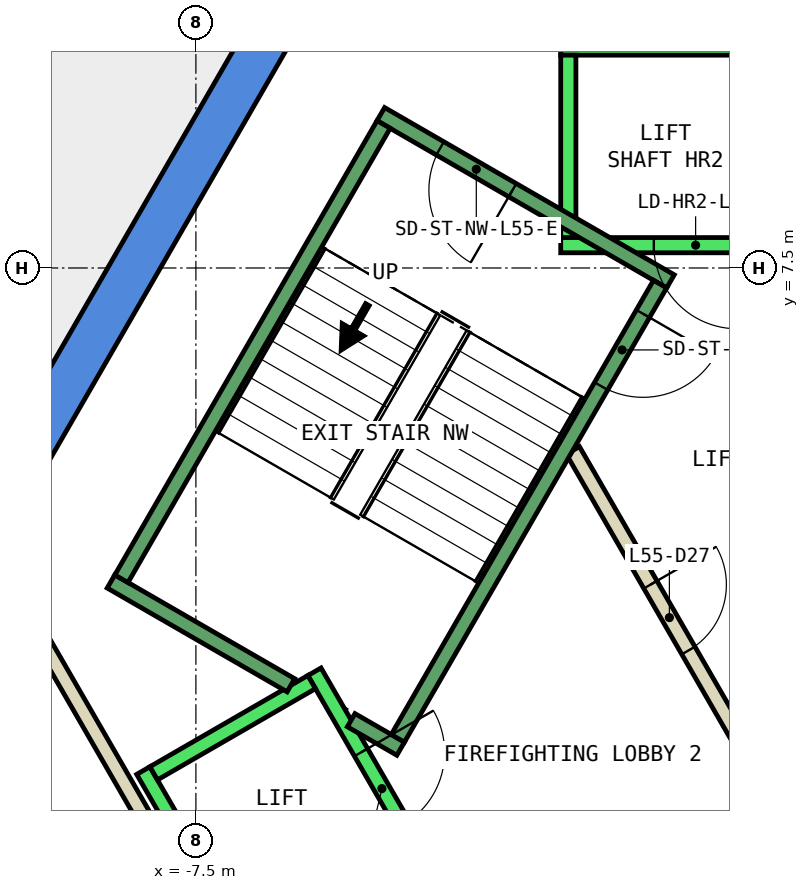
"""IFC4 building model, lengths in metres.
Left out: names, types, materials, properties, quantities, classifications, styles, units other than length and angle.
Written with IfcOpenShell. Run it as: python <this file> out.ifc"""

import sys

from ifc_helpers import new_model, si_unit, direction, frame, frame_2d, origin, place, context, subcontext, project, spatial, polyline, rectangle, outline, extrude, element, fill, save


model = new_model("IFC4")
c1 = context("Model", 3, precision=1e-05, world=origin(), true_north=direction((0.0, 1.0)))
c2 = subcontext(c1, "Body", "Model", "MODEL_VIEW")
j1 = project(units=[si_unit("LENGTHUNIT", "METRE"), si_unit("PLANEANGLEUNIT", "RADIAN")], contexts=[c1])
p1 = place(None, origin())
s1 = spatial("IfcSite", under=j1, at=p1, CompositionType="ELEMENT")
p2 = place(p1, origin())
s2 = spatial("IfcBuilding", under=s1, at=p2, CompositionType="ELEMENT")
p3 = place(p2, frame((0.0, 0.0, 245.0)))
s3 = spatial("IfcBuildingStorey", under=s2, at=p3, CompositionType="ELEMENT", Elevation=245.0)
p4 = place(p3, frame((0.0, 0.0, -0.34)))
e1 = element("IfcWall", 1, at=p4, inside=s3, PredefinedType="SHEAR", context=c2, shape_type="SweptSolid", body=[
    extrude(outline(polyline([(-10.535, 4.253), (-10.015, 3.953), (-5.427, 11.9), (-5.774, 12.5), (-10.535, 4.253)])), origin(), (0.0, 0.0, 1.0), 3.6),
])
p5 = place(p3, frame((0.0, 0.0, -0.34)))
e2 = element("IfcWall", 2, at=p5, inside=s3, PredefinedType="SHEAR", context=c2, shape_type="SweptSolid", body=[
    extrude(outline(polyline([(-11.547, 2.5), (-5.774, -7.5), (-5.427, -6.9), (-10.854, 2.5), (-11.547, 2.5)])), origin(), (0.0, 0.0, 1.0), 3.6),
])
p6 = place(p3, frame((-10.576, 9.849, 0.0), z_axis=(0.0, 0.0, 1.0), x_axis=(0.517026085378, 0.855969641423, 0.0)))
e3 = element("IfcWall", 3, at=p6, inside=s3, PredefinedType="PARTITIONING", context=c2, shape_type="SweptSolid", body=[
    extrude(rectangle(XDim=6.408, YDim=0.2, at=frame_2d((3.204, 0.0))), origin(), (0.0, 0.0, 1.0), 3.26),
])
p7 = place(p6, frame((2.779, 0.0, 0.0)))
e4 = element("IfcOpeningElement", 4, at=p7, cuts=e3, PredefinedType="OPENING", context=c2, shape_type="SweptSolid", body=[
    extrude(rectangle(XDim=1.0, YDim=2.1, at=frame_2d((0.5, 1.05))), frame((0.0, 0.11, 0.0), z_axis=(0.0, -1.0, 0.0), x_axis=(1.0, 0.0, 0.0)), (0.0, 0.0, 1.0), 0.22),
])
p8 = place(p3, frame((-9.751, 2.99, 0.0), z_axis=(0.0, 0.0, 1.0), x_axis=(0.500012163284, -0.866018381195, 0.0)))
e5 = element("IfcWall", 5, at=p8, inside=s3, PredefinedType="PARTITIONING", context=c2, shape_type="SweptSolid", body=[
    extrude(rectangle(XDim=8.0, YDim=0.2, at=frame_2d((4.0, 0.0))), origin(), (0.0, 0.0, 1.0), 3.26),
])
p9 = place(p3, frame((-0.982, -1.0, 0.0), z_axis=(0.0, 0.0, 1.0), x_axis=(0.50024047865, 0.865886518847, 0.0)))
e6 = element("IfcWall", 6, at=p9, inside=s3, PredefinedType="PARTITIONING", context=c2, shape_type="SweptSolid", body=[
    extrude(rectangle(XDim=1.863, YDim=0.2, at=frame_2d((0.931, 0.0))), origin(), (0.0, 0.0, 1.0), 3.26),
])
p10 = place(p3, frame((-2.54, 5.1, 0.0), z_axis=(0.0, 0.0, 1.0), x_axis=(0.499925051871, -0.866068670783, 0.0)))
e7 = element("IfcWall", 7, at=p10, inside=s3, PredefinedType="PARTITIONING", context=c2, shape_type="SweptSolid", body=[
    extrude(rectangle(XDim=5.181, YDim=0.2, at=frame_2d((2.59, 0.0))), origin(), (0.0, 0.0, 1.0), 3.26),
])
p11 = place(p10, frame((2.04, 0.0, 0.0)))
e8 = element("IfcOpeningElement", 8, at=p11, cuts=e7, PredefinedType="OPENING", context=c2, shape_type="SweptSolid", body=[
    extrude(rectangle(XDim=1.0, YDim=2.1, at=frame_2d((0.5, 1.05))), frame((0.0, 0.11, 0.0), z_axis=(0.0, -1.0, 0.0), x_axis=(1.0, 0.0, 0.0)), (0.0, 0.0, 1.0), 0.22),
])
p12 = place(p3, frame((2.7, 7.8, 0.0), z_axis=(0.0, 0.0, 1.0), x_axis=(-1.0, 0.0, 0.0)))
e9 = element("IfcWall", 9, at=p12, inside=s3, PredefinedType="STANDARD", context=c2, shape_type="SweptSolid", body=[
    extrude(rectangle(XDim=5.4, YDim=0.2, at=frame_2d((2.7, 0.0))), origin(), (0.0, 0.0, 1.0), 3.26),
])
p13 = place(p12, frame((1.225, 0.0, 0.0)))
e10 = element("IfcOpeningElement", 10, at=p13, cuts=e9, PredefinedType="OPENING", context=c2, shape_type="SweptSolid", body=[
    extrude(rectangle(XDim=1.1, YDim=2.1, at=frame_2d((0.55, 1.05))), frame((0.0, 0.11, 0.0), z_axis=(0.0, -1.0, 0.0), x_axis=(1.0, 0.0, 0.0)), (0.0, 0.0, 1.0), 0.22),
])
p14 = place(p12, frame((3.075, 0.0, 0.0)))
e11 = element("IfcOpeningElement", 11, at=p14, cuts=e9, PredefinedType="OPENING", context=c2, shape_type="SweptSolid", body=[
    extrude(rectangle(XDim=1.1, YDim=2.1, at=frame_2d((0.55, 1.05))), frame((0.0, 0.11, 0.0), z_axis=(0.0, -1.0, 0.0), x_axis=(1.0, 0.0, 0.0)), (0.0, 0.0, 1.0), 0.22),
])
p15 = place(p3, frame((2.7, 10.4, 0.0), z_axis=(0.0, 0.0, 1.0), x_axis=(-1.0, 0.0, 0.0)))
e12 = element("IfcWall", 12, at=p15, inside=s3, PredefinedType="STANDARD", context=c2, shape_type="SweptSolid", body=[
    extrude(rectangle(XDim=5.4, YDim=0.2, at=frame_2d((2.7, 0.0))), origin(), (0.0, 0.0, 1.0), 3.26),
])
p16 = place(p3, frame((-2.6, 7.9, 0.0), z_axis=(0.0, 0.0, 1.0), x_axis=(0.0, 1.0, 0.0)))
e13 = element("IfcWall", 13, at=p16, inside=s3, PredefinedType="STANDARD", context=c2, shape_type="SweptSolid", body=[
    extrude(rectangle(XDim=2.4, YDim=0.2, at=frame_2d((1.2, 0.0))), origin(), (0.0, 0.0, 1.0), 3.26),
])
p17 = place(p3, frame((-5.94, 2.188, 0.0), z_axis=(0.0, 0.0, 1.0), x_axis=(0.500034260056, -0.866005622828, 0.0)))
e14 = element("IfcWall", 14, at=p17, inside=s3, PredefinedType="STANDARD", context=c2, shape_type="SweptSolid", body=[
    extrude(rectangle(XDim=5.399, YDim=0.2, at=frame_2d((2.7, 0.0))), origin(), (0.0, 0.0, 1.0), 3.26),
])
p18 = place(p17, frame((3.075, 0.0, 0.0)))
e15 = element("IfcOpeningElement", 15, at=p18, cuts=e14, PredefinedType="OPENING", context=c2, shape_type="SweptSolid", body=[
    extrude(rectangle(XDim=1.1, YDim=2.1, at=frame_2d((0.55, 1.05))), frame((0.0, 0.11, 0.0), z_axis=(0.0, -1.0, 0.0), x_axis=(1.0, 0.0, 0.0)), (0.0, 0.0, 1.0), 0.22),
])
p19 = place(p17, frame((1.225, 0.0, 0.0)))
e16 = element("IfcOpeningElement", 16, at=p19, cuts=e14, PredefinedType="OPENING", context=c2, shape_type="SweptSolid", body=[
    extrude(rectangle(XDim=1.1, YDim=2.1, at=frame_2d((0.55, 1.05))), frame((0.0, 0.11, 0.0), z_axis=(0.0, -1.0, 0.0), x_axis=(1.0, 0.0, 0.0)), (0.0, 0.0, 1.0), 0.22),
])
p20 = place(p3, frame((-8.192, 0.888, 0.0), z_axis=(0.0, 0.0, 1.0), x_axis=(0.500034260056, -0.866005622828, 0.0)))
e17 = element("IfcWall", 17, at=p20, inside=s3, PredefinedType="STANDARD", context=c2, shape_type="SweptSolid", body=[
    extrude(rectangle(XDim=5.399, YDim=0.2, at=frame_2d((2.7, 0.0))), origin(), (0.0, 0.0, 1.0), 3.26),
])
p21 = place(p3, frame((-5.977, 2.052, 0.0), z_axis=(0.0, 0.0, 1.0), x_axis=(-0.865973769406, -0.500089422704, 0.0)))
e18 = element("IfcWall", 18, at=p21, inside=s3, PredefinedType="STANDARD", context=c2, shape_type="SweptSolid", body=[
    extrude(rectangle(XDim=2.399, YDim=0.2, at=frame_2d((1.2, 0.0))), origin(), (0.0, 0.0, 1.0), 3.26),
])
p22 = place(p3, frame((-1.256, 7.324, 0.0), z_axis=(0.0, 0.0, 1.0), x_axis=(-0.866046073146, 0.499964197906, 0.0)))
e19 = element("IfcWall", 19, at=p22, inside=s3, PredefinedType="STANDARD", context=c2, shape_type="SweptSolid", body=[
    extrude(rectangle(XDim=4.4, YDim=0.2, at=frame_2d((2.2, 0.0))), origin(), (0.0, 0.0, 1.0), 3.26),
])
p23 = place(p22, frame((2.4, 0.0, 0.0)))
e20 = element("IfcOpeningElement", 20, at=p23, cuts=e19, PredefinedType="OPENING", context=c2, shape_type="SweptSolid", body=[
    extrude(rectangle(XDim=1.1, YDim=2.2, at=frame_2d((0.55, 1.1))), frame((0.0, 0.11, 0.0), z_axis=(0.0, -1.0, 0.0), x_axis=(1.0, 0.0, 0.0)), (0.0, 0.0, 1.0), 0.22),
])
p24 = place(p3, frame((-6.25, 2.01, 0.0), z_axis=(0.0, 0.0, 1.0), x_axis=(-0.86611865017, 0.499838457731, 0.0)))
e21 = element("IfcWall", 21, at=p24, inside=s3, PredefinedType="STANDARD", context=c2, shape_type="SweptSolid", body=[
    extrude(rectangle(XDim=2.733, YDim=0.2, at=frame_2d((1.366, 0.0))), origin(), (0.0, 0.0, 1.0), 3.26),
])
p25 = place(p3, frame((-4.806, 1.176, 0.0), z_axis=(0.0, 0.0, 1.0), x_axis=(-0.866558586415, 0.499075361355, 0.0)))
e22 = element("IfcWall", 22, at=p25, inside=s3, PredefinedType="STANDARD", context=c2, shape_type="SweptSolid", body=[
    extrude(rectangle(XDim=0.751, YDim=0.2, at=frame_2d((0.376, 0.0))), origin(), (0.0, 0.0, 1.0), 3.26),
])
p26 = place(p3, frame((-1.393, 7.288, 0.0), z_axis=(0.0, 0.0, 1.0), x_axis=(-0.499963383562, -0.866046543262, 0.0)))
e23 = element("IfcWall", 23, at=p26, inside=s3, PredefinedType="STANDARD", context=c2, shape_type="SweptSolid", body=[
    extrude(rectangle(XDim=6.9, YDim=0.2, at=frame_2d((3.45, 0.0))), origin(), (0.0, 0.0, 1.0), 3.26),
])
p27 = place(p26, frame((0.45, 0.0, 0.0)))
e24 = element("IfcOpeningElement", 24, at=p27, cuts=e23, PredefinedType="OPENING", context=c2, shape_type="SweptSolid", body=[
    extrude(rectangle(XDim=1.1, YDim=2.2, at=frame_2d((0.55, 1.1))), frame((0.0, 0.11, 0.0), z_axis=(0.0, -1.0, 0.0), x_axis=(1.0, 0.0, 0.0)), (0.0, 0.0, 1.0), 0.22),
])
p28 = place(p3, frame((-5.03, 9.388, 0.0), z_axis=(0.0, 0.0, 1.0), x_axis=(-0.499978703459, -0.866037698999, 0.0)))
e25 = element("IfcWall", 25, at=p28, inside=s3, PredefinedType="STANDARD", context=c2, shape_type="SweptSolid", body=[
    extrude(rectangle(XDim=6.9, YDim=0.2, at=frame_2d((3.45, 0.0))), origin(), (0.0, 0.0, 1.0), 3.26),
])
p29 = place(p11, origin())
e26 = element("IfcDoor", 26, at=p29, inside=s3, OperationType="SINGLE_SWING_RIGHT", PredefinedType="DOOR", context=c2, shape_type="SweptSolid", body=[
    extrude(rectangle(XDim=1.0, YDim=2.1, at=frame_2d((0.5, 1.05))), frame((0.0, 0.025, 0.0), z_axis=(0.0, -1.0, 0.0), x_axis=(1.0, 0.0, 0.0)), (0.0, 0.0, 1.0), 0.05),
])
fill(e8, e26)
p30 = place(p14, origin())
e27 = element("IfcDoor", 27, at=p30, inside=s3, OperationType="SLIDING_TO_LEFT", PredefinedType="DOOR", context=c2, shape_type="SweptSolid", body=[
    extrude(rectangle(XDim=1.1, YDim=2.1, at=frame_2d((0.55, 1.05))), frame((0.0, 0.025, 0.0), z_axis=(0.0, -1.0, 0.0), x_axis=(1.0, 0.0, 0.0)), (0.0, 0.0, 1.0), 0.05),
])
fill(e11, e27)
p31 = place(p19, origin())
e28 = element("IfcDoor", 28, at=p31, inside=s3, OperationType="SLIDING_TO_LEFT", PredefinedType="DOOR", context=c2, shape_type="SweptSolid", body=[
    extrude(rectangle(XDim=1.1, YDim=2.1, at=frame_2d((0.55, 1.05))), frame((0.0, 0.025, 0.0), z_axis=(0.0, -1.0, 0.0), x_axis=(1.0, 0.0, 0.0)), (0.0, 0.0, 1.0), 0.05),
])
fill(e16, e28)
p32 = place(p27, origin())
e29 = element("IfcDoor", 29, at=p32, inside=s3, OperationType="SINGLE_SWING_LEFT", PredefinedType="DOOR", context=c2, shape_type="SweptSolid", body=[
    extrude(rectangle(XDim=1.1, YDim=2.2, at=frame_2d((0.55, 1.1))), frame((0.0, 0.025, 0.0), z_axis=(0.0, -1.0, 0.0), x_axis=(1.0, 0.0, 0.0)), (0.0, 0.0, 1.0), 0.05),
])
fill(e24, e29)
p33 = place(p23, origin())
e30 = element("IfcDoor", 30, at=p33, inside=s3, OperationType="SINGLE_SWING_LEFT", PredefinedType="DOOR", context=c2, shape_type="SweptSolid", body=[
    extrude(rectangle(XDim=1.1, YDim=2.2, at=frame_2d((0.55, 1.1))), frame((0.0, 0.025, 0.0), z_axis=(0.0, -1.0, 0.0), x_axis=(1.0, 0.0, 0.0)), (0.0, 0.0, 1.0), 0.05),
])
fill(e20, e30)
save(model, sys.argv[1])
